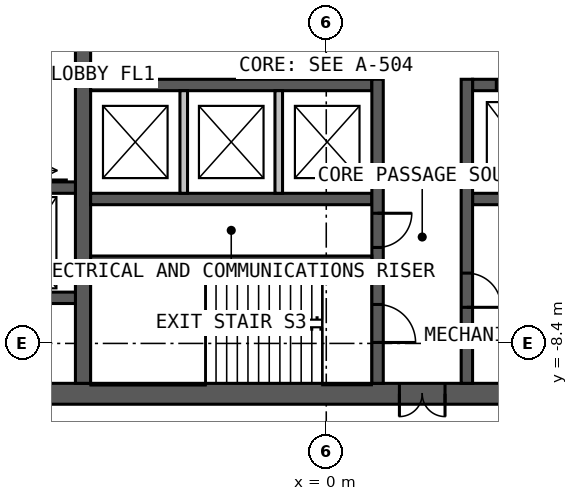
"""IFC4 building model, lengths in metres.
Left out: names, types, materials, properties, quantities, classifications, styles, units other than length and angle.
Written with IfcOpenShell. Run it as: python <this file> out.ifc"""

import sys

from ifc_helpers import new_model, si_unit, direction, frame, frame_2d, origin, place, context, subcontext, project, spatial, rectangle, extrude, element, fill, save


model = new_model("IFC4")
c1 = context("Model", 3, precision=1e-05, world=origin(), true_north=direction((0.0, 1.0)))
c2 = subcontext(c1, "Body", "Model", "MODEL_VIEW")
j1 = project(units=[si_unit("LENGTHUNIT", "METRE"), si_unit("PLANEANGLEUNIT", "RADIAN")], contexts=[c1])
p1 = place(None, origin())
s1 = spatial("IfcSite", under=j1, at=p1, CompositionType="ELEMENT")
p2 = place(p1, origin())
s2 = spatial("IfcBuilding", under=s1, at=p2, CompositionType="ELEMENT")
p3 = place(p2, frame((0.0, 0.0, 134.0)))
s3 = spatial("IfcBuildingStorey", under=s2, at=p3, CompositionType="ELEMENT", Elevation=134.0)
p4 = place(p3, frame((10.0, -9.725, 0.0), z_axis=(0.0, 0.0, 1.0), x_axis=(-1.0, 0.0, 0.0)))
e1 = element("IfcWall", 1, at=p4, inside=s3, PredefinedType="SOLIDWALL", context=c2, shape_type="SweptSolid", body=[
    extrude(rectangle(XDim=20.0, YDim=0.55, at=frame_2d((10.0, 0.0))), origin(), (0.0, 0.0, 1.0), 4.0),
])
p5 = place(p4, frame((6.875, 0.0, 0.0)))
e2 = element("IfcOpeningElement", 2, at=p5, cuts=e1, PredefinedType="OPENING", context=c2, shape_type="SweptSolid", body=[
    extrude(rectangle(XDim=1.2, YDim=2.2, at=frame_2d((0.6, 1.1))), frame((0.0, 0.285, 0.0), z_axis=(0.0, -1.0, 0.0), x_axis=(1.0, 0.0, 0.0)), (0.0, 0.0, 1.0), 0.57),
])
p6 = place(p3, frame((-6.4, -9.45, 0.0), z_axis=(0.0, 0.0, 1.0), x_axis=(0.0, 1.0, 0.0)))
e3 = element("IfcWall", 3, at=p6, inside=s3, PredefinedType="SOLIDWALL", context=c2, shape_type="SweptSolid", body=[
    extrude(rectangle(XDim=18.9, YDim=0.4, at=frame_2d((9.45, 0.0))), origin(), (0.0, 0.0, 1.0), 4.0),
])
p7 = place(p6, frame((8.95, 0.0, 0.0)))
e4 = element("IfcOpeningElement", 4, at=p7, cuts=e3, PredefinedType="OPENING", context=c2, shape_type="SweptSolid", body=[
    extrude(rectangle(XDim=1.0, YDim=2.2, at=frame_2d((0.5, 1.1))), frame((0.0, 0.21, 0.0), z_axis=(0.0, -1.0, 0.0), x_axis=(1.0, 0.0, 0.0)), (0.0, 0.0, 1.0), 0.42),
])
p8 = place(p3, frame((-6.2, -1.6, 0.0), z_axis=(0.0, 0.0, 1.0), x_axis=(1.0, 0.0, 0.0)))
e5 = element("IfcWall", 5, at=p8, inside=s3, PredefinedType="SOLIDWALL", context=c2, shape_type="SweptSolid", body=[
    extrude(rectangle(XDim=7.4, YDim=0.3, at=frame_2d((3.7, 0.0))), origin(), (0.0, 0.0, 1.0), 4.0),
])
p9 = place(p3, frame((3.85, -1.6, 0.0), z_axis=(0.0, 0.0, 1.0), x_axis=(1.0, 0.0, 0.0)))
e6 = element("IfcWall", 6, at=p9, inside=s3, PredefinedType="SOLIDWALL", context=c2, shape_type="SweptSolid", body=[
    extrude(rectangle(XDim=2.35, YDim=0.3, at=frame_2d((1.175, 0.0))), origin(), (0.0, 0.0, 1.0), 4.0),
])
p10 = place(p9, frame((0.625, 0.0, 0.0)))
e7 = element("IfcOpeningElement", 7, at=p10, cuts=e6, PredefinedType="OPENING", context=c2, shape_type="SweptSolid", body=[
    extrude(rectangle(XDim=1.1, YDim=2.2, at=frame_2d((0.55, 1.1))), frame((0.0, 0.16, 0.0), z_axis=(0.0, -1.0, 0.0), x_axis=(1.0, 0.0, 0.0)), (0.0, 0.0, 1.0), 0.32),
])
p11 = place(p3, frame((-6.2, -4.6, 0.0), z_axis=(0.0, 0.0, 1.0), x_axis=(1.0, 0.0, 0.0)))
e8 = element("IfcWall", 8, at=p11, inside=s3, PredefinedType="SOLIDWALL", context=c2, shape_type="SweptSolid", body=[
    extrude(rectangle(XDim=7.4, YDim=0.3, at=frame_2d((3.7, 0.0))), origin(), (0.0, 0.0, 1.0), 4.0),
])
p12 = place(p3, frame((3.85, -4.6, 0.0), z_axis=(0.0, 0.0, 1.0), x_axis=(1.0, 0.0, 0.0)))
e9 = element("IfcWall", 9, at=p12, inside=s3, PredefinedType="SOLIDWALL", context=c2, shape_type="SweptSolid", body=[
    extrude(rectangle(XDim=2.35, YDim=0.3, at=frame_2d((1.175, 0.0))), origin(), (0.0, 0.0, 1.0), 4.0),
])
p13 = place(p3, frame((1.35, -1.45, 0.0), z_axis=(0.0, 0.0, 1.0), x_axis=(0.0, -1.0, 0.0)))
e10 = element("IfcWall", 10, at=p13, inside=s3, PredefinedType="SOLIDWALL", context=c2, shape_type="SweptSolid", body=[
    extrude(rectangle(XDim=8.0, YDim=0.3, at=frame_2d((4.0, 0.0))), origin(), (0.0, 0.0, 1.0), 4.0),
])
p14 = place(p13, frame((5.925, 0.0, 0.0)))
e11 = element("IfcOpeningElement", 11, at=p14, cuts=e10, PredefinedType="OPENING", context=c2, shape_type="SweptSolid", body=[
    extrude(rectangle(XDim=1.0, YDim=2.2, at=frame_2d((0.5, 1.1))), frame((0.0, 0.16, 0.0), z_axis=(0.0, -1.0, 0.0), x_axis=(1.0, 0.0, 0.0)), (0.0, 0.0, 1.0), 0.32),
])
p15 = place(p13, frame((3.525, 0.0, 0.0)))
e12 = element("IfcOpeningElement", 12, at=p15, cuts=e10, PredefinedType="OPENING", context=c2, shape_type="SweptSolid", body=[
    extrude(rectangle(XDim=0.9, YDim=2.2, at=frame_2d((0.45, 1.1))), frame((0.0, 0.16, 0.0), z_axis=(0.0, -1.0, 0.0), x_axis=(1.0, 0.0, 0.0)), (0.0, 0.0, 1.0), 0.32),
])
p16 = place(p3, frame((3.7, -1.45, 0.0), z_axis=(0.0, 0.0, 1.0), x_axis=(0.0, -1.0, 0.0)))
e13 = element("IfcWall", 13, at=p16, inside=s3, PredefinedType="SOLIDWALL", context=c2, shape_type="SweptSolid", body=[
    extrude(rectangle(XDim=8.0, YDim=0.3, at=frame_2d((4.0, 0.0))), origin(), (0.0, 0.0, 1.0), 4.0),
])
p17 = place(p16, frame((5.1, 0.0, 0.0)))
e14 = element("IfcOpeningElement", 14, at=p17, cuts=e13, PredefinedType="OPENING", context=c2, shape_type="SweptSolid", body=[
    extrude(rectangle(XDim=0.9, YDim=2.2, at=frame_2d((0.45, 1.1))), frame((0.0, 0.16, 0.0), z_axis=(0.0, -1.0, 0.0), x_axis=(1.0, 0.0, 0.0)), (0.0, 0.0, 1.0), 0.32),
])
p18 = place(p3, frame((-6.2, -6.2, 0.0), z_axis=(0.0, 0.0, 1.0), x_axis=(1.0, 0.0, 0.0)))
e15 = element("IfcWall", 15, at=p18, inside=s3, PredefinedType="SOLIDWALL", context=c2, shape_type="SweptSolid", body=[
    extrude(rectangle(XDim=7.4, YDim=0.2, at=frame_2d((3.7, 0.0))), origin(), (0.0, 0.0, 1.0), 4.0),
])
p19 = place(p3, frame((-9.45, -4.3, 0.0), z_axis=(0.0, 0.0, 1.0), x_axis=(1.0, 0.0, 0.0)))
e16 = element("IfcWall", 16, at=p19, inside=s3, PredefinedType="SOLIDWALL", context=c2, shape_type="SweptSolid", body=[
    extrude(rectangle(XDim=2.85, YDim=0.3, at=frame_2d((1.425, 0.0))), origin(), (0.0, 0.0, 1.0), 4.0),
])
p20 = place(p19, frame((1.0, 0.0, 0.0)))
e17 = element("IfcOpeningElement", 17, at=p20, cuts=e16, PredefinedType="OPENING", context=c2, shape_type="SweptSolid", body=[
    extrude(rectangle(XDim=1.1, YDim=2.2, at=frame_2d((0.55, 1.1))), frame((0.0, 0.16, 0.0), z_axis=(0.0, -1.0, 0.0), x_axis=(1.0, 0.0, 0.0)), (0.0, 0.0, 1.0), 0.32),
])
p21 = place(p3, frame((-9.45, -7.2, 0.0), z_axis=(0.0, 0.0, 1.0), x_axis=(1.0, 0.0, 0.0)))
e18 = element("IfcWall", 18, at=p21, inside=s3, PredefinedType="SOLIDWALL", context=c2, shape_type="SweptSolid", body=[
    extrude(rectangle(XDim=2.85, YDim=0.3, at=frame_2d((1.425, 0.0))), origin(), (0.0, 0.0, 1.0), 4.0),
])
for number, where, z_axis, x_axis in (
    (19, (-3.75, -1.75, 0.0), (0.0, 0.0, 1.0), (0.0, -1.0, 0.0)),
    (20, (-1.25, -1.75, 0.0), (0.0, 0.0, 1.0), (0.0, -1.0, 0.0)),
):
    element("IfcWall", number, at=place(p3, frame(where, z_axis=z_axis, x_axis=x_axis)), inside=s3, PredefinedType="SOLIDWALL", context=c2, shape_type="SweptSolid", body=[
        extrude(rectangle(XDim=2.7, YDim=0.2, at=frame_2d((1.35, 0.0))), origin(), (0.0, 0.0, 1.0), 3.75),
    ])
p22 = place(p5, origin())
e21 = element("IfcDoor", 21, at=p22, inside=s3, OperationType="DOUBLE_DOOR_SINGLE_SWING", PredefinedType="DOOR", context=c2, shape_type="SweptSolid", body=[
    extrude(rectangle(XDim=1.2, YDim=2.2, at=frame_2d((0.6, 1.1))), frame((0.0, 0.025, 0.0), z_axis=(0.0, -1.0, 0.0), x_axis=(1.0, 0.0, 0.0)), (0.0, 0.0, 1.0), 0.05),
])
fill(e2, e21)
p23 = place(p14, origin())
e22 = element("IfcDoor", 22, at=p23, inside=s3, OperationType="SINGLE_SWING_RIGHT", PredefinedType="DOOR", context=c2, shape_type="SweptSolid", body=[
    extrude(rectangle(XDim=1.0, YDim=2.2, at=frame_2d((0.5, 1.1))), frame((0.0, 0.025, 0.0), z_axis=(0.0, -1.0, 0.0), x_axis=(1.0, 0.0, 0.0)), (0.0, 0.0, 1.0), 0.05),
])
fill(e11, e22)
p24 = place(p15, origin())
e23 = element("IfcDoor", 23, at=p24, inside=s3, OperationType="SINGLE_SWING_LEFT", PredefinedType="DOOR", context=c2, shape_type="SweptSolid", body=[
    extrude(rectangle(XDim=0.9, YDim=2.2, at=frame_2d((0.45, 1.1))), frame((0.0, 0.025, 0.0), z_axis=(0.0, -1.0, 0.0), x_axis=(1.0, 0.0, 0.0)), (0.0, 0.0, 1.0), 0.05),
])
fill(e12, e23)
p25 = place(p17, origin())
e24 = element("IfcDoor", 24, at=p25, inside=s3, OperationType="SINGLE_SWING_RIGHT", PredefinedType="DOOR", context=c2, shape_type="SweptSolid", body=[
    extrude(rectangle(XDim=0.9, YDim=2.2, at=frame_2d((0.45, 1.1))), frame((0.0, 0.025, 0.0), z_axis=(0.0, -1.0, 0.0), x_axis=(1.0, 0.0, 0.0)), (0.0, 0.0, 1.0), 0.05),
])
fill(e14, e24)
p26 = place(p10, origin())
e25 = element("IfcDoor", 25, at=p26, inside=s3, OperationType="SLIDING_TO_LEFT", PredefinedType="DOOR", context=c2, shape_type="SweptSolid", body=[
    extrude(rectangle(XDim=1.1, YDim=2.2, at=frame_2d((0.55, 1.1))), frame((0.0, 0.025, 0.0), z_axis=(0.0, -1.0, 0.0), x_axis=(1.0, 0.0, 0.0)), (0.0, 0.0, 1.0), 0.05),
])
fill(e7, e25)
save(model, sys.argv[1])
